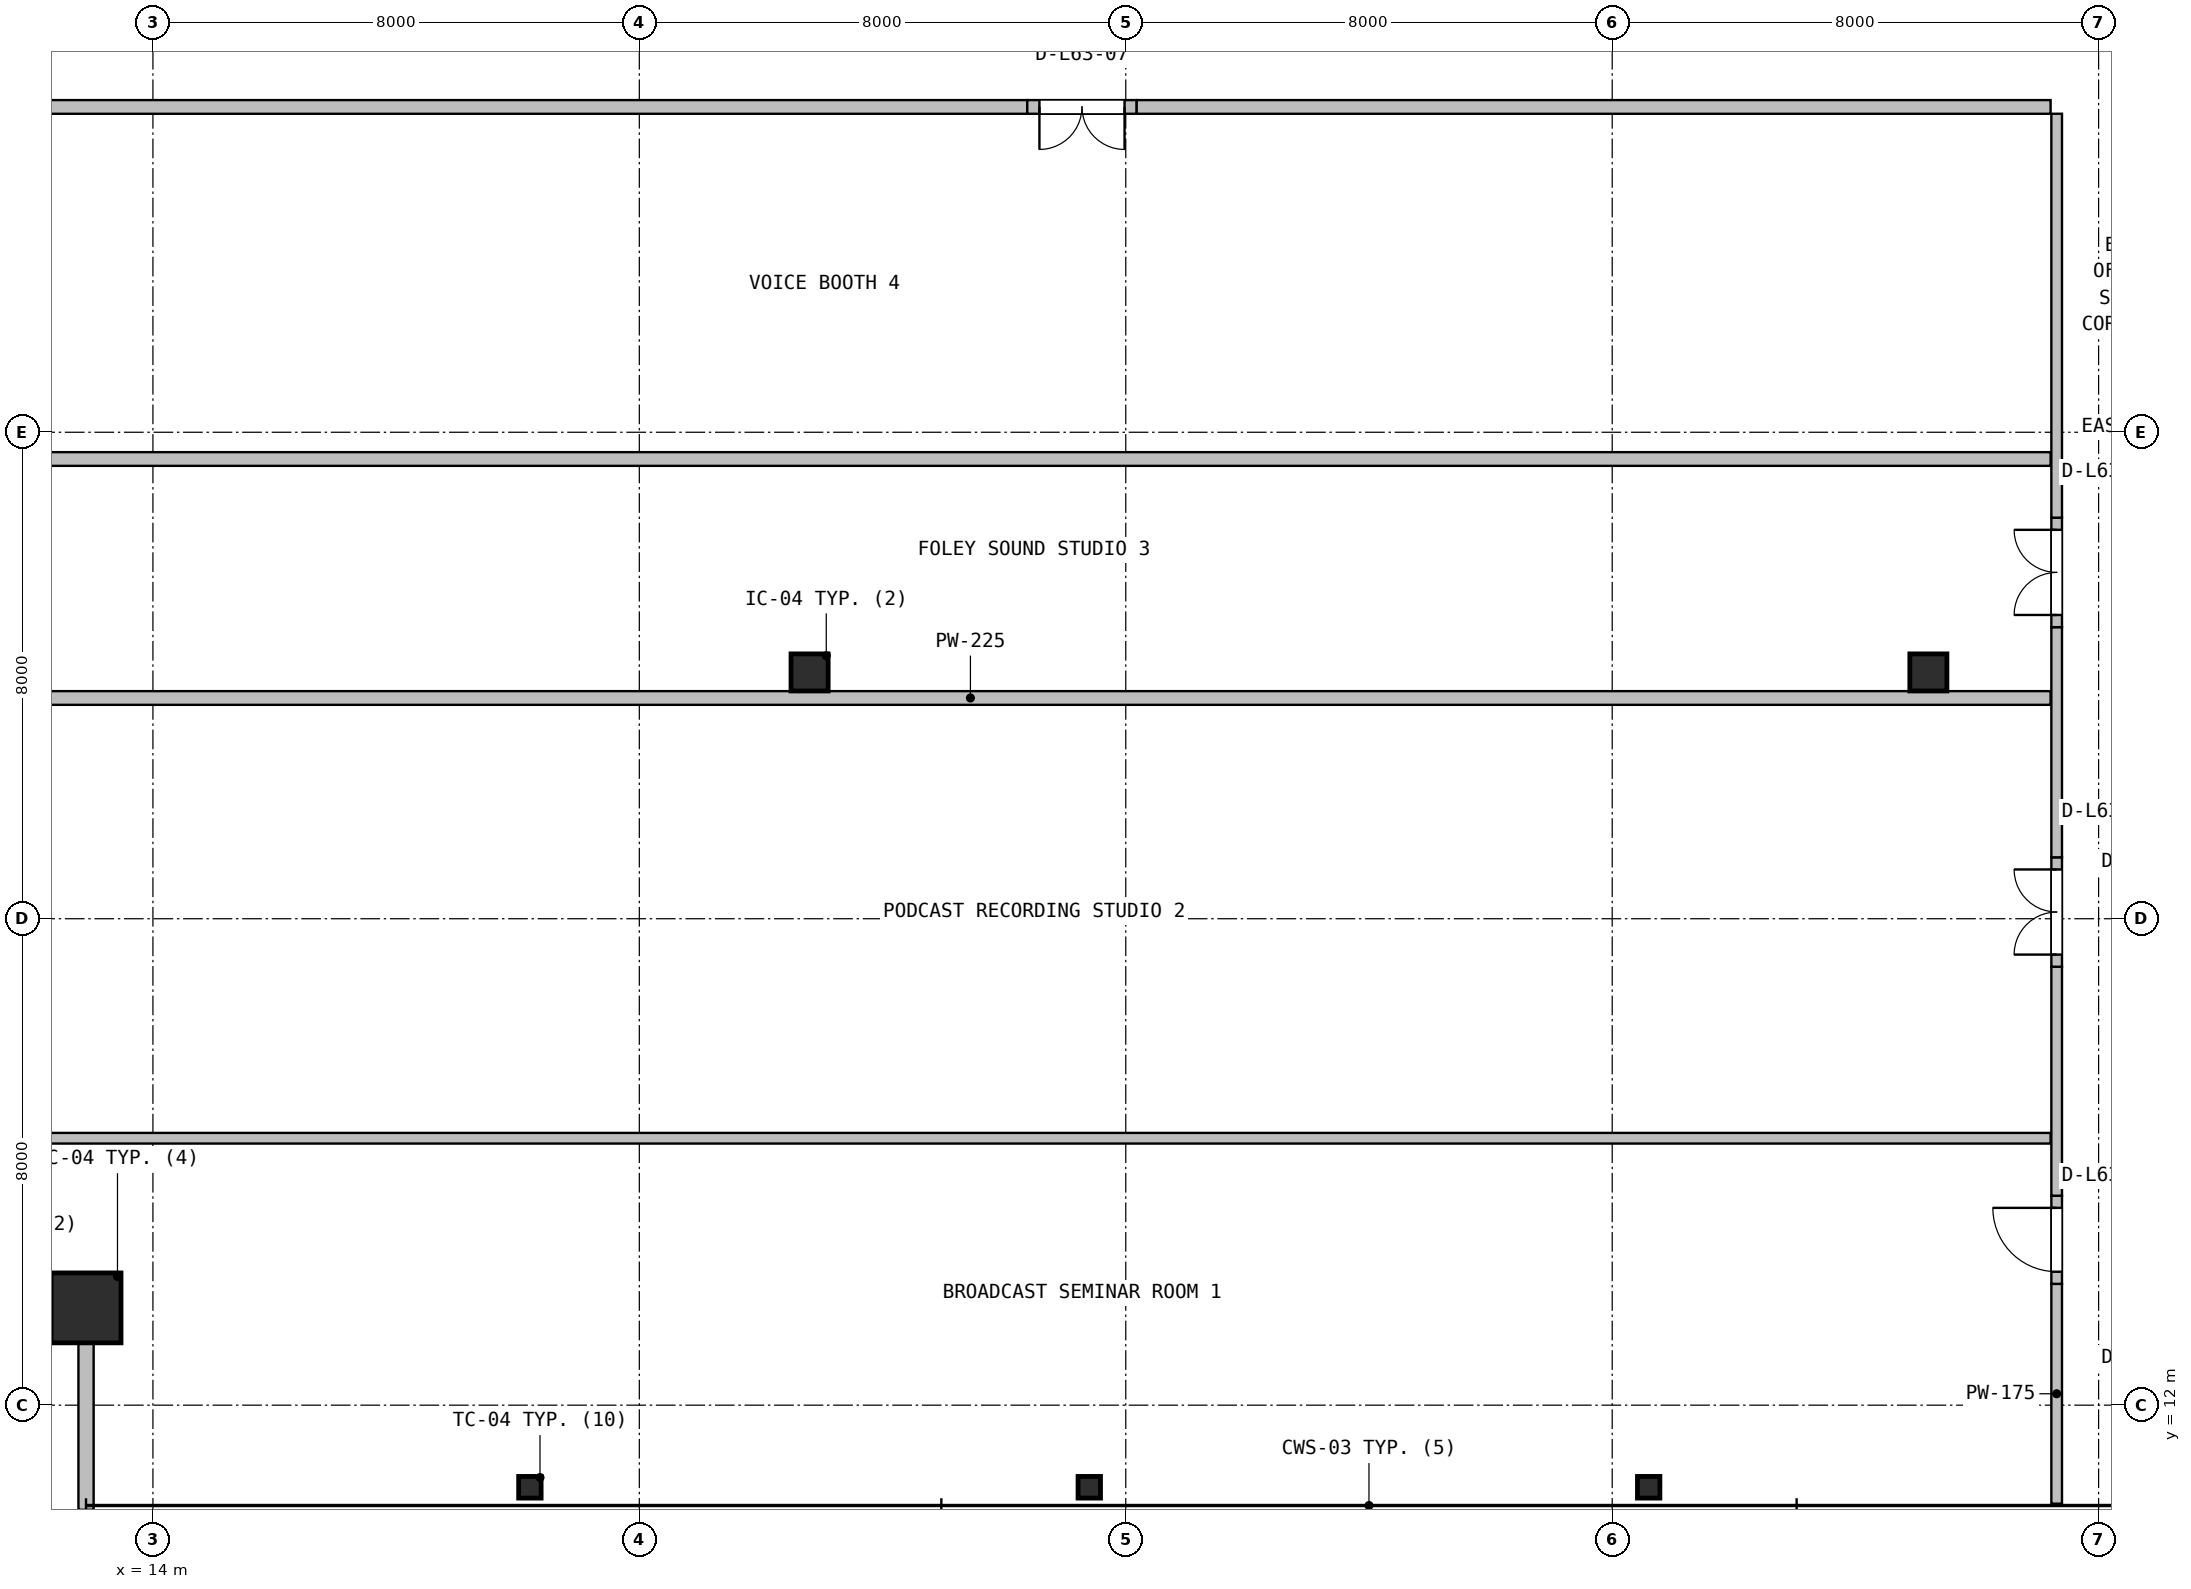
"""IFC4 building model, lengths in metres.
Left out: names, types, materials, properties, quantities, classifications, styles, units other than length and angle.
Written with IfcOpenShell. Run it as: python <this file> out.ifc"""

import sys

from ifc_helpers import new_model, si_unit, direction, frame, frame_2d, origin, origin_2d, place, context, subcontext, project, spatial, rectangle, hollow_rectangle, hollow_circle, i_section, extrude, source, transform, mapped, element, fill, save


model = new_model("IFC4")
c1 = context("Model", 3, precision=1e-05, world=origin(), true_north=direction((0.0, 1.0)))
c2 = subcontext(c1, "Body", "Model", "MODEL_VIEW")
j1 = project(units=[si_unit("LENGTHUNIT", "METRE"), si_unit("PLANEANGLEUNIT", "RADIAN")], contexts=[c1])
p1 = place(None, origin())
s1 = spatial("IfcSite", under=j1, at=p1, CompositionType="ELEMENT")
p2 = place(p1, origin())
s2 = spatial("IfcBuilding", under=s1, at=p2, CompositionType="ELEMENT")
p3 = place(p2, frame((0.0, 0.0, 254.6)))
s3 = spatial("IfcBuildingStorey", under=s2, at=p3, CompositionType="ELEMENT", Elevation=254.6)
m1 = source(origin(), c2, "Body", "SweptSolid", [
    extrude(hollow_rectangle(XDim=1.15, YDim=1.15, WallThickness=0.045, at=origin_2d()), origin(), (0.0, 0.0, 1.0), 3.8),
])
p4 = place(p3, frame((12.9, 13.6, 0.0), z_axis=(0.0, 0.0, 1.0), x_axis=(1.0, 0.0, 0.0)))
e1 = element("IfcColumn", 1, at=p4, inside=s3, PredefinedType="COLUMN", context=c2, shape_type="MappedRepresentation", body=[
    mapped(m1, transform((0.0, 0.0, 0.0), x_axis=(1.0, 0.0, 0.0), y_axis=(0.0, 1.0, 0.0), z_axis=(0.0, 0.0, 1.0), scale=1.0)),
])
m2 = source(origin(), c2, "Body", "SweptSolid", [
    extrude(i_section(OverallWidth=0.369, OverallDepth=0.356, WebThickness=0.011, FlangeThickness=0.018, FilletRadius=0.016, at=origin_2d()), origin(), (0.0, 0.0, 1.0), 3.8),
])
for number, where, z_axis, x_axis in (
    (2, (20.2, 10.65, 0.0), (0.0, 0.0, 1.0), (1.0, 0.0, 0.0)),
    (3, (29.4, 10.65, 0.0), (0.0, 0.0, 1.0), (1.0, 0.0, 0.0)),
    (4, (38.6, 10.65, 0.0), (0.0, 0.0, 1.0), (1.0, 0.0, 0.0)),
):
    element("IfcColumn", number, at=place(p3, frame(where, z_axis=z_axis, x_axis=x_axis)), inside=s3, PredefinedType="COLUMN", context=c2, shape_type="MappedRepresentation", body=[
        mapped(m2, transform((0.0, 0.0, 0.0), x_axis=(1.0, 0.0, 0.0), y_axis=(0.0, 1.0, 0.0), z_axis=(0.0, 0.0, 1.0), scale=1.0)),
    ])
m3 = source(origin(), c2, "Body", "SweptSolid", [
    extrude(hollow_circle(Radius=0.305, WallThickness=0.025, at=origin_2d()), origin(), (0.0, 0.0, 1.0), 3.8),
])
for number, where, z_axis, x_axis in (
    (5, (24.8, 24.05, 0.0), (0.0, 0.0, 1.0), (1.0, 0.0, 0.0)),
    (6, (43.2, 24.05, 0.0), (0.0, 0.0, 1.0), (1.0, 0.0, 0.0)),
):
    element("IfcColumn", number, at=place(p3, frame(where, z_axis=z_axis, x_axis=x_axis)), inside=s3, PredefinedType="COLUMN", context=c2, shape_type="MappedRepresentation", body=[
        mapped(m3, transform((0.0, 0.0, 0.0), x_axis=(1.0, 0.0, 0.0), y_axis=(0.0, 1.0, 0.0), z_axis=(0.0, 0.0, 1.0), scale=1.0)),
    ])
p5 = place(p3, frame((12.9, 10.28, 0.0), z_axis=(0.0, 0.0, 1.0), x_axis=(0.0, 1.0, 0.0)))
e7 = element("IfcWall", 7, at=p5, inside=s3, PredefinedType="SOLIDWALL", context=c2, shape_type="SweptSolid", body=[
    extrude(rectangle(XDim=3.4, YDim=0.25, at=frame_2d((1.7, 0.0))), origin(), (0.0, 0.0, 1.0), 1.925),
])
p6 = place(p3, frame((45.31, 10.38, 0.0), z_axis=(0.0, 0.0, 1.0), x_axis=(0.0, 1.0, 0.0)))
e8 = element("IfcWall", 8, at=p6, inside=s3, PredefinedType="PARTITIONING", context=c2, shape_type="SweptSolid", body=[
    extrude(rectangle(XDim=3.615, YDim=0.175, at=frame_2d((1.808, 0.0))), origin(), (0.0, 0.0, 1.0), 1.925),
])
p7 = place(p3, frame((45.31, 13.995, 0.0), z_axis=(0.0, 0.0, 1.0), x_axis=(0.0, 1.0, 0.0)))
e9 = element("IfcWall", 9, at=p7, inside=s3, PredefinedType="PARTITIONING", context=c2, shape_type="SweptSolid", body=[
    extrude(rectangle(XDim=1.45, YDim=0.175, at=frame_2d((0.725, 0.0))), origin(), (0.0, 0.0, 1.0), 3.278),
])
p8 = place(p7, frame((0.2, 0.0, 0.0)))
e10 = element("IfcOpeningElement", 10, at=p8, cuts=e9, PredefinedType="OPENING", context=c2, shape_type="SweptSolid", body=[
    extrude(rectangle(XDim=1.05, YDim=2.1, at=frame_2d((0.525, 1.05))), frame((0.0, 0.098, 0.0), z_axis=(0.0, -1.0, 0.0), x_axis=(1.0, 0.0, 0.0)), (0.0, 0.0, 1.0), 0.195),
])
p9 = place(p3, frame((45.31, 15.445, 0.0), z_axis=(0.0, 0.0, 1.0), x_axis=(0.0, 1.0, 0.0)))
e11 = element("IfcWall", 11, at=p9, inside=s3, PredefinedType="PARTITIONING", context=c2, shape_type="SweptSolid", body=[
    extrude(rectangle(XDim=3.765, YDim=0.175, at=frame_2d((1.882, 0.0))), origin(), (0.0, 0.0, 1.0), 2.195),
])
p10 = place(p3, frame((45.31, 19.21, 0.0), z_axis=(0.0, 0.0, 1.0), x_axis=(0.0, 1.0, 0.0)))
e12 = element("IfcWall", 12, at=p10, inside=s3, PredefinedType="PARTITIONING", context=c2, shape_type="SweptSolid", body=[
    extrude(rectangle(XDim=1.8, YDim=0.175, at=frame_2d((0.9, 0.0))), origin(), (0.0, 0.0, 1.0), 2.195),
])
p11 = place(p10, frame((0.2, 0.0, 0.0)))
e13 = element("IfcOpeningElement", 13, at=p11, cuts=e12, PredefinedType="OPENING", context=c2, shape_type="SweptSolid", body=[
    extrude(rectangle(XDim=1.4, YDim=2.12, at=frame_2d((0.7, 1.06))), frame((0.0, 0.098, 0.0), z_axis=(0.0, -1.0, 0.0), x_axis=(1.0, 0.0, 0.0)), (0.0, 0.0, 1.0), 0.195),
])
p12 = place(p3, frame((45.31, 21.01, 0.0), z_axis=(0.0, 0.0, 1.0), x_axis=(0.0, 1.0, 0.0)))
e14 = element("IfcWall", 14, at=p12, inside=s3, PredefinedType="PARTITIONING", context=c2, shape_type="SweptSolid", body=[
    extrude(rectangle(XDim=3.785, YDim=0.175, at=frame_2d((1.893, 0.0))), origin(), (0.0, 0.0, 1.0), 1.925),
])
p13 = place(p3, frame((45.31, 24.795, 0.0), z_axis=(0.0, 0.0, 1.0), x_axis=(0.0, 1.0, 0.0)))
e15 = element("IfcWall", 15, at=p13, inside=s3, PredefinedType="PARTITIONING", context=c2, shape_type="SweptSolid", body=[
    extrude(rectangle(XDim=1.8, YDim=0.175, at=frame_2d((0.9, 0.0))), origin(), (0.0, 0.0, 1.0), 2.195),
])
p14 = place(p13, frame((0.2, 0.0, 0.0)))
e16 = element("IfcOpeningElement", 16, at=p14, cuts=e15, PredefinedType="OPENING", context=c2, shape_type="SweptSolid", body=[
    extrude(rectangle(XDim=1.4, YDim=2.12, at=frame_2d((0.7, 1.06))), frame((0.0, 0.098, 0.0), z_axis=(0.0, -1.0, 0.0), x_axis=(1.0, 0.0, 0.0)), (0.0, 0.0, 1.0), 0.195),
])
p15 = place(p3, frame((45.31, 26.595, 0.0), z_axis=(0.0, 0.0, 1.0), x_axis=(0.0, 1.0, 0.0)))
e17 = element("IfcWall", 17, at=p15, inside=s3, PredefinedType="PARTITIONING", context=c2, shape_type="SweptSolid", body=[
    extrude(rectangle(XDim=6.643, YDim=0.175, at=frame_2d((3.322, 0.0))), origin(), (0.0, 0.0, 1.0), 3.222),
])
p16 = place(p3, frame((9.68, 16.39, 0.0), z_axis=(0.0, 0.0, 1.0), x_axis=(1.0, 0.0, 0.0)))
e18 = element("IfcWall", 18, at=p16, inside=s3, PredefinedType="PARTITIONING", context=c2, shape_type="SweptSolid", body=[
    extrude(rectangle(XDim=35.53, YDim=0.175, at=frame_2d((17.765, 0.0))), origin(), (0.0, 0.0, 1.0), 1.925),
])
for number, where, z_axis, x_axis in (
    (19, (9.68, 23.63, 0.0), (0.0, 0.0, 1.0), (1.0, 0.0, 0.0)),
    (20, (9.68, 27.56, 0.0), (0.0, 0.0, 1.0), (1.0, 0.0, 0.0)),
):
    element("IfcWall", number, at=place(p3, frame(where, z_axis=z_axis, x_axis=x_axis)), inside=s3, PredefinedType="PARTITIONING", context=c2, shape_type="SweptSolid", body=[
        extrude(rectangle(XDim=35.53, YDim=0.225, at=frame_2d((17.765, 0.0))), origin(), (0.0, 0.0, 1.0), 1.925),
    ])
p17 = place(p3, frame((9.68, 33.35, 0.0), z_axis=(0.0, 0.0, 1.0), x_axis=(1.0, 0.0, 0.0)))
e21 = element("IfcWall", 21, at=p17, inside=s3, PredefinedType="PARTITIONING", context=c2, shape_type="SweptSolid", body=[
    extrude(rectangle(XDim=18.7, YDim=0.225, at=frame_2d((9.35, 0.0))), origin(), (0.0, 0.0, 1.0), 1.925),
])
p18 = place(p3, frame((28.38, 33.35, 0.0), z_axis=(0.0, 0.0, 1.0), x_axis=(1.0, 0.0, 0.0)))
e22 = element("IfcWall", 22, at=p18, inside=s3, PredefinedType="PARTITIONING", context=c2, shape_type="SweptSolid", body=[
    extrude(rectangle(XDim=1.8, YDim=0.225, at=frame_2d((0.9, 0.0))), origin(), (0.0, 0.0, 1.0), 2.195),
])
p19 = place(p18, frame((0.2, 0.0, 0.0)))
e23 = element("IfcOpeningElement", 23, at=p19, cuts=e22, PredefinedType="OPENING", context=c2, shape_type="SweptSolid", body=[
    extrude(rectangle(XDim=1.4, YDim=2.12, at=frame_2d((0.7, 1.06))), frame((0.0, 0.123, 0.0), z_axis=(0.0, -1.0, 0.0), x_axis=(1.0, 0.0, 0.0)), (0.0, 0.0, 1.0), 0.245),
])
p20 = place(p3, frame((30.18, 33.35, 0.0), z_axis=(0.0, 0.0, 1.0), x_axis=(1.0, 0.0, 0.0)))
e24 = element("IfcWall", 24, at=p20, inside=s3, PredefinedType="PARTITIONING", context=c2, shape_type="SweptSolid", body=[
    extrude(rectangle(XDim=15.03, YDim=0.225, at=frame_2d((7.515, 0.0))), origin(), (0.0, 0.0, 1.0), 2.195),
])
m4 = source(origin(), c2, "Body", "SweptSolid", [
    extrude(rectangle(XDim=1.05, YDim=2.1, at=frame_2d((0.525, 1.05))), frame((0.0, 0.025, 0.0), z_axis=(0.0, -1.0, 0.0), x_axis=(1.0, 0.0, 0.0)), (0.0, 0.0, 1.0), 0.05),
])
p21 = place(p8, origin())
e25 = element("IfcDoor", 25, at=p21, inside=s3, OperationType="SINGLE_SWING_RIGHT", PredefinedType="DOOR", context=c2, shape_type="MappedRepresentation", body=[
    mapped(m4, transform((0.0, 0.0, 0.0), x_axis=(1.0, 0.0, 0.0), y_axis=(0.0, 1.0, 0.0), z_axis=(0.0, 0.0, 1.0), scale=1.0)),
])
fill(e10, e25)
m5 = source(origin(), c2, "Body", "SweptSolid", [
    extrude(rectangle(XDim=1.4, YDim=2.12, at=frame_2d((0.7, 1.06))), frame((0.0, 0.025, 0.0), z_axis=(0.0, -1.0, 0.0), x_axis=(1.0, 0.0, 0.0)), (0.0, 0.0, 1.0), 0.05),
])
p22 = place(p11, origin())
e26 = element("IfcDoor", 26, at=p22, inside=s3, OperationType="DOUBLE_DOOR_SINGLE_SWING", PredefinedType="DOOR", context=c2, shape_type="MappedRepresentation", body=[
    mapped(m5, transform((0.0, 0.0, 0.0), x_axis=(1.0, 0.0, 0.0), y_axis=(0.0, 1.0, 0.0), z_axis=(0.0, 0.0, 1.0), scale=1.0)),
])
fill(e13, e26)
p23 = place(p14, origin())
e27 = element("IfcDoor", 27, at=p23, inside=s3, OperationType="DOUBLE_DOOR_SINGLE_SWING", PredefinedType="DOOR", context=c2, shape_type="MappedRepresentation", body=[
    mapped(m5, transform((0.0, 0.0, 0.0), x_axis=(1.0, 0.0, 0.0), y_axis=(0.0, 1.0, 0.0), z_axis=(0.0, 0.0, 1.0), scale=1.0)),
])
fill(e16, e27)
p24 = place(p19, frame((1.4, 0.0, 0.0), z_axis=(0.0, 0.0, 1.0), x_axis=(-1.0, 0.0, 0.0)))
e28 = element("IfcDoor", 28, at=p24, inside=s3, OperationType="DOUBLE_DOOR_SINGLE_SWING", PredefinedType="DOOR", context=c2, shape_type="MappedRepresentation", body=[
    mapped(m5, transform((0.0, 0.0, 0.0), x_axis=(1.0, 0.0, 0.0), y_axis=(0.0, 1.0, 0.0), z_axis=(0.0, 0.0, 1.0), scale=1.0)),
])
fill(e23, e28)
save(model, sys.argv[1])
